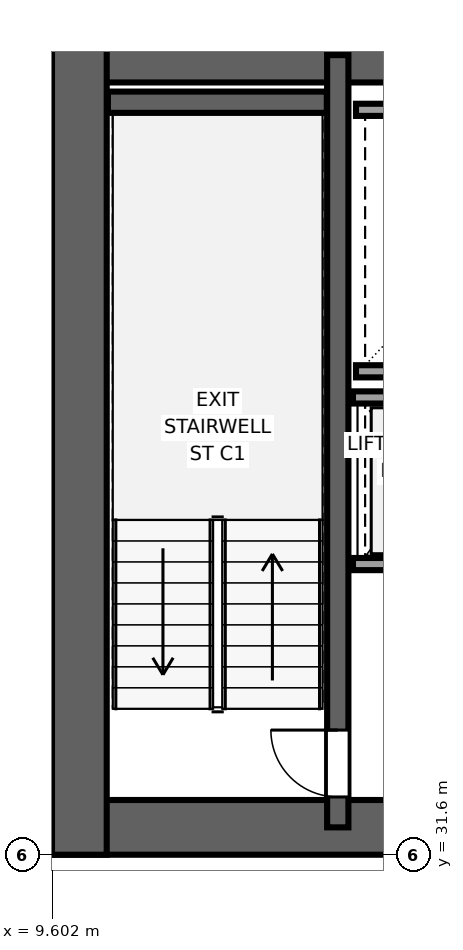
"""IFC4 building model, lengths in metres.
Left out: names, types, materials, properties, quantities, classifications, styles, units other than length and angle.
Written with IfcOpenShell. Run it as: python <this file> out.ifc"""

import sys

from ifc_helpers import new_model, si_unit, direction, frame, frame_2d, origin, place, context, subcontext, project, spatial, rectangle, extrude, source, transform, mapped, element, fill, save


model = new_model("IFC4")
c1 = context("Model", 3, precision=1e-05, world=origin(), true_north=direction((0.0, 1.0)))
c2 = subcontext(c1, "Body", "Model", "MODEL_VIEW")
j1 = project(units=[si_unit("LENGTHUNIT", "METRE"), si_unit("PLANEANGLEUNIT", "RADIAN")], contexts=[c1])
p1 = place(None, origin())
s1 = spatial("IfcSite", under=j1, at=p1, CompositionType="ELEMENT")
p2 = place(p1, origin())
s2 = spatial("IfcBuilding", under=s1, at=p2, CompositionType="ELEMENT")
p3 = place(p2, frame((0.0, 0.0, 85.25)))
s3 = spatial("IfcBuildingStorey", under=s2, at=p3, CompositionType="ELEMENT", Elevation=85.25)
p4 = place(p3, frame((9.6, 32.05, 0.0), z_axis=(0.0, 0.0, 1.0), x_axis=(1.0, 0.0, 0.0)))
e1 = element("IfcWall", 1, at=p4, inside=s3, PredefinedType="SHEAR", context=c2, shape_type="SweptSolid", body=[
    extrude(rectangle(XDim=26.8, YDim=0.9, at=frame_2d((13.4, 0.0))), origin(), (0.0, 0.0, 1.0), 3.55),
])
p5 = place(p4, frame((7.85, 0.0, 0.0), z_axis=(0.0, 0.0, 1.0), x_axis=(-1.0, 0.0, 0.0)))
e2 = element("IfcOpeningElement", 2, at=p5, cuts=e1, PredefinedType="OPENING", context=c2, shape_type="SweptSolid", body=[
    extrude(rectangle(XDim=1.5, YDim=2.04, at=frame_2d((0.75, 1.02))), frame((0.0, 0.46, 0.0), z_axis=(0.0, -1.0, 0.0), x_axis=(1.0, 0.0, 0.0)), (0.0, 0.0, 1.0), 0.92),
])
p6 = place(p4, frame((14.15, 0.0, 0.0), z_axis=(0.0, 0.0, 1.0), x_axis=(-1.0, 0.0, 0.0)))
e3 = element("IfcOpeningElement", 3, at=p6, cuts=e1, PredefinedType="OPENING", context=c2, shape_type="SweptSolid", body=[
    extrude(rectangle(XDim=1.5, YDim=2.04, at=frame_2d((0.75, 1.02))), frame((0.0, 0.46, 0.0), z_axis=(0.0, -1.0, 0.0), x_axis=(1.0, 0.0, 0.0)), (0.0, 0.0, 1.0), 0.92),
])
p7 = place(p4, frame((20.45, 0.0, 0.0), z_axis=(0.0, 0.0, 1.0), x_axis=(-1.0, 0.0, 0.0)))
e4 = element("IfcOpeningElement", 4, at=p7, cuts=e1, PredefinedType="OPENING", context=c2, shape_type="SweptSolid", body=[
    extrude(rectangle(XDim=1.5, YDim=2.04, at=frame_2d((0.75, 1.02))), frame((0.0, 0.46, 0.0), z_axis=(0.0, -1.0, 0.0), x_axis=(1.0, 0.0, 0.0)), (0.0, 0.0, 1.0), 0.92),
])
p8 = place(p3, frame((9.6, 44.75, 0.0), z_axis=(0.0, 0.0, 1.0), x_axis=(1.0, 0.0, 0.0)))
e5 = element("IfcWall", 5, at=p8, inside=s3, PredefinedType="SHEAR", context=c2, shape_type="SweptSolid", body=[
    extrude(rectangle(XDim=26.8, YDim=0.9, at=frame_2d((13.4, 0.0))), origin(), (0.0, 0.0, 1.0), 3.55),
])
p9 = place(p3, frame((10.05, 31.6, 0.0), z_axis=(0.0, 0.0, 1.0), x_axis=(0.0, 1.0, 0.0)))
e6 = element("IfcWall", 6, at=p9, inside=s3, PredefinedType="SHEAR", context=c2, shape_type="SweptSolid", body=[
    extrude(rectangle(XDim=13.6, YDim=0.9, at=frame_2d((6.8, 0.0))), origin(), (0.0, 0.0, 1.0), 3.55),
])
p10 = place(p3, frame((14.3, 32.05, 0.0), z_axis=(0.0, 0.0, 1.0), x_axis=(0.0, 1.0, 0.0)))
e7 = element("IfcWall", 7, at=p10, inside=s3, PredefinedType="SHEAR", context=c2, shape_type="SweptSolid", body=[
    extrude(rectangle(XDim=12.7, YDim=0.35, at=frame_2d((6.35, 0.0))), origin(), (0.0, 0.0, 1.0), 3.55),
])
p11 = place(p10, frame((0.5, 0.0, 0.0)))
e8 = element("IfcOpeningElement", 8, at=p11, cuts=e7, PredefinedType="OPENING", context=c2, shape_type="SweptSolid", body=[
    extrude(rectangle(XDim=1.1, YDim=2.12, at=frame_2d((0.55, 1.06))), frame((0.0, 0.185, 0.0), z_axis=(0.0, -1.0, 0.0), x_axis=(1.0, 0.0, 0.0)), (0.0, 0.0, 1.0), 0.37),
])
p12 = place(p3, frame((10.52, 43.975, 0.0), z_axis=(0.0, 0.0, 1.0), x_axis=(1.0, 0.0, 0.0)))
e9 = element("IfcWall", 9, at=p12, inside=s3, PredefinedType="SHEAR", context=c2, shape_type="SweptSolid", body=[
    extrude(rectangle(XDim=3.6, YDim=0.35, at=frame_2d((1.8, 0.0))), origin(), (0.0, 0.0, 1.0), 3.55),
])
for number, where, z_axis, x_axis in (
    (10, (14.6, 39.55, 0.0), (0.0, 0.0, 1.0), (1.0, 0.0, 0.0)),
    (11, (14.6, 43.85, 0.0), (0.0, 0.0, 1.0), (1.0, 0.0, 0.0)),
):
    element("IfcWall", number, at=place(p3, frame(where, z_axis=z_axis, x_axis=x_axis)), inside=s3, PredefinedType="SOLIDWALL", context=c2, shape_type="SweptSolid", body=[
        extrude(rectangle(XDim=4.1, YDim=0.2, at=frame_2d((2.05, 0.0))), origin(), (0.0, 0.0, 1.0), 3.37),
    ])
p13 = place(p3, frame((14.55, 36.38, 0.0), z_axis=(0.0, 0.0, 1.0), x_axis=(1.0, 0.0, 0.0)))
e12 = element("IfcWall", 12, at=p13, inside=s3, PredefinedType="SOLIDWALL", context=c2, shape_type="SweptSolid", body=[
    extrude(rectangle(XDim=4.075, YDim=0.2, at=frame_2d((2.038, 0.0))), origin(), (0.0, 0.0, 1.0), 3.37),
])
p14 = place(p13, frame((0.55, 0.0, 0.0)))
e13 = element("IfcOpeningElement", 13, at=p14, cuts=e12, PredefinedType="OPENING", context=c2, shape_type="SweptSolid", body=[
    extrude(rectangle(XDim=1.1, YDim=2.12, at=frame_2d((0.55, 1.06))), frame((0.0, 0.11, 0.0), z_axis=(0.0, -1.0, 0.0), x_axis=(1.0, 0.0, 0.0)), (0.0, 0.0, 1.0), 0.22),
])
p15 = place(p13, frame((2.45, 0.0, 0.0)))
e14 = element("IfcOpeningElement", 14, at=p15, cuts=e12, PredefinedType="OPENING", context=c2, shape_type="SweptSolid", body=[
    extrude(rectangle(XDim=1.1, YDim=2.12, at=frame_2d((0.55, 1.06))), frame((0.0, 0.11, 0.0), z_axis=(0.0, -1.0, 0.0), x_axis=(1.0, 0.0, 0.0)), (0.0, 0.0, 1.0), 0.22),
])
p16 = place(p3, frame((14.55, 39.12, 0.0), z_axis=(0.0, 0.0, 1.0), x_axis=(1.0, 0.0, 0.0)))
e15 = element("IfcWall", 15, at=p16, inside=s3, PredefinedType="SOLIDWALL", context=c2, shape_type="SweptSolid", body=[
    extrude(rectangle(XDim=4.075, YDim=0.2, at=frame_2d((2.038, 0.0))), origin(), (0.0, 0.0, 1.0), 3.37),
])
m1 = source(origin(), c2, "Body", "SweptSolid", [
    extrude(rectangle(XDim=1.1, YDim=2.12, at=frame_2d((0.55, 1.06))), frame((0.0, 0.025, 0.0), z_axis=(0.0, -1.0, 0.0), x_axis=(1.0, 0.0, 0.0)), (0.0, 0.0, 1.0), 0.05),
])
p17 = place(p11, origin())
e16 = element("IfcDoor", 16, at=p17, inside=s3, OperationType="SINGLE_SWING_RIGHT", PredefinedType="DOOR", context=c2, shape_type="MappedRepresentation", body=[
    mapped(m1, transform((0.0, 0.0, 0.0), x_axis=(1.0, 0.0, 0.0), y_axis=(0.0, 1.0, 0.0), z_axis=(0.0, 0.0, 1.0), scale=1.0)),
])
fill(e8, e16)
save(model, sys.argv[1])
